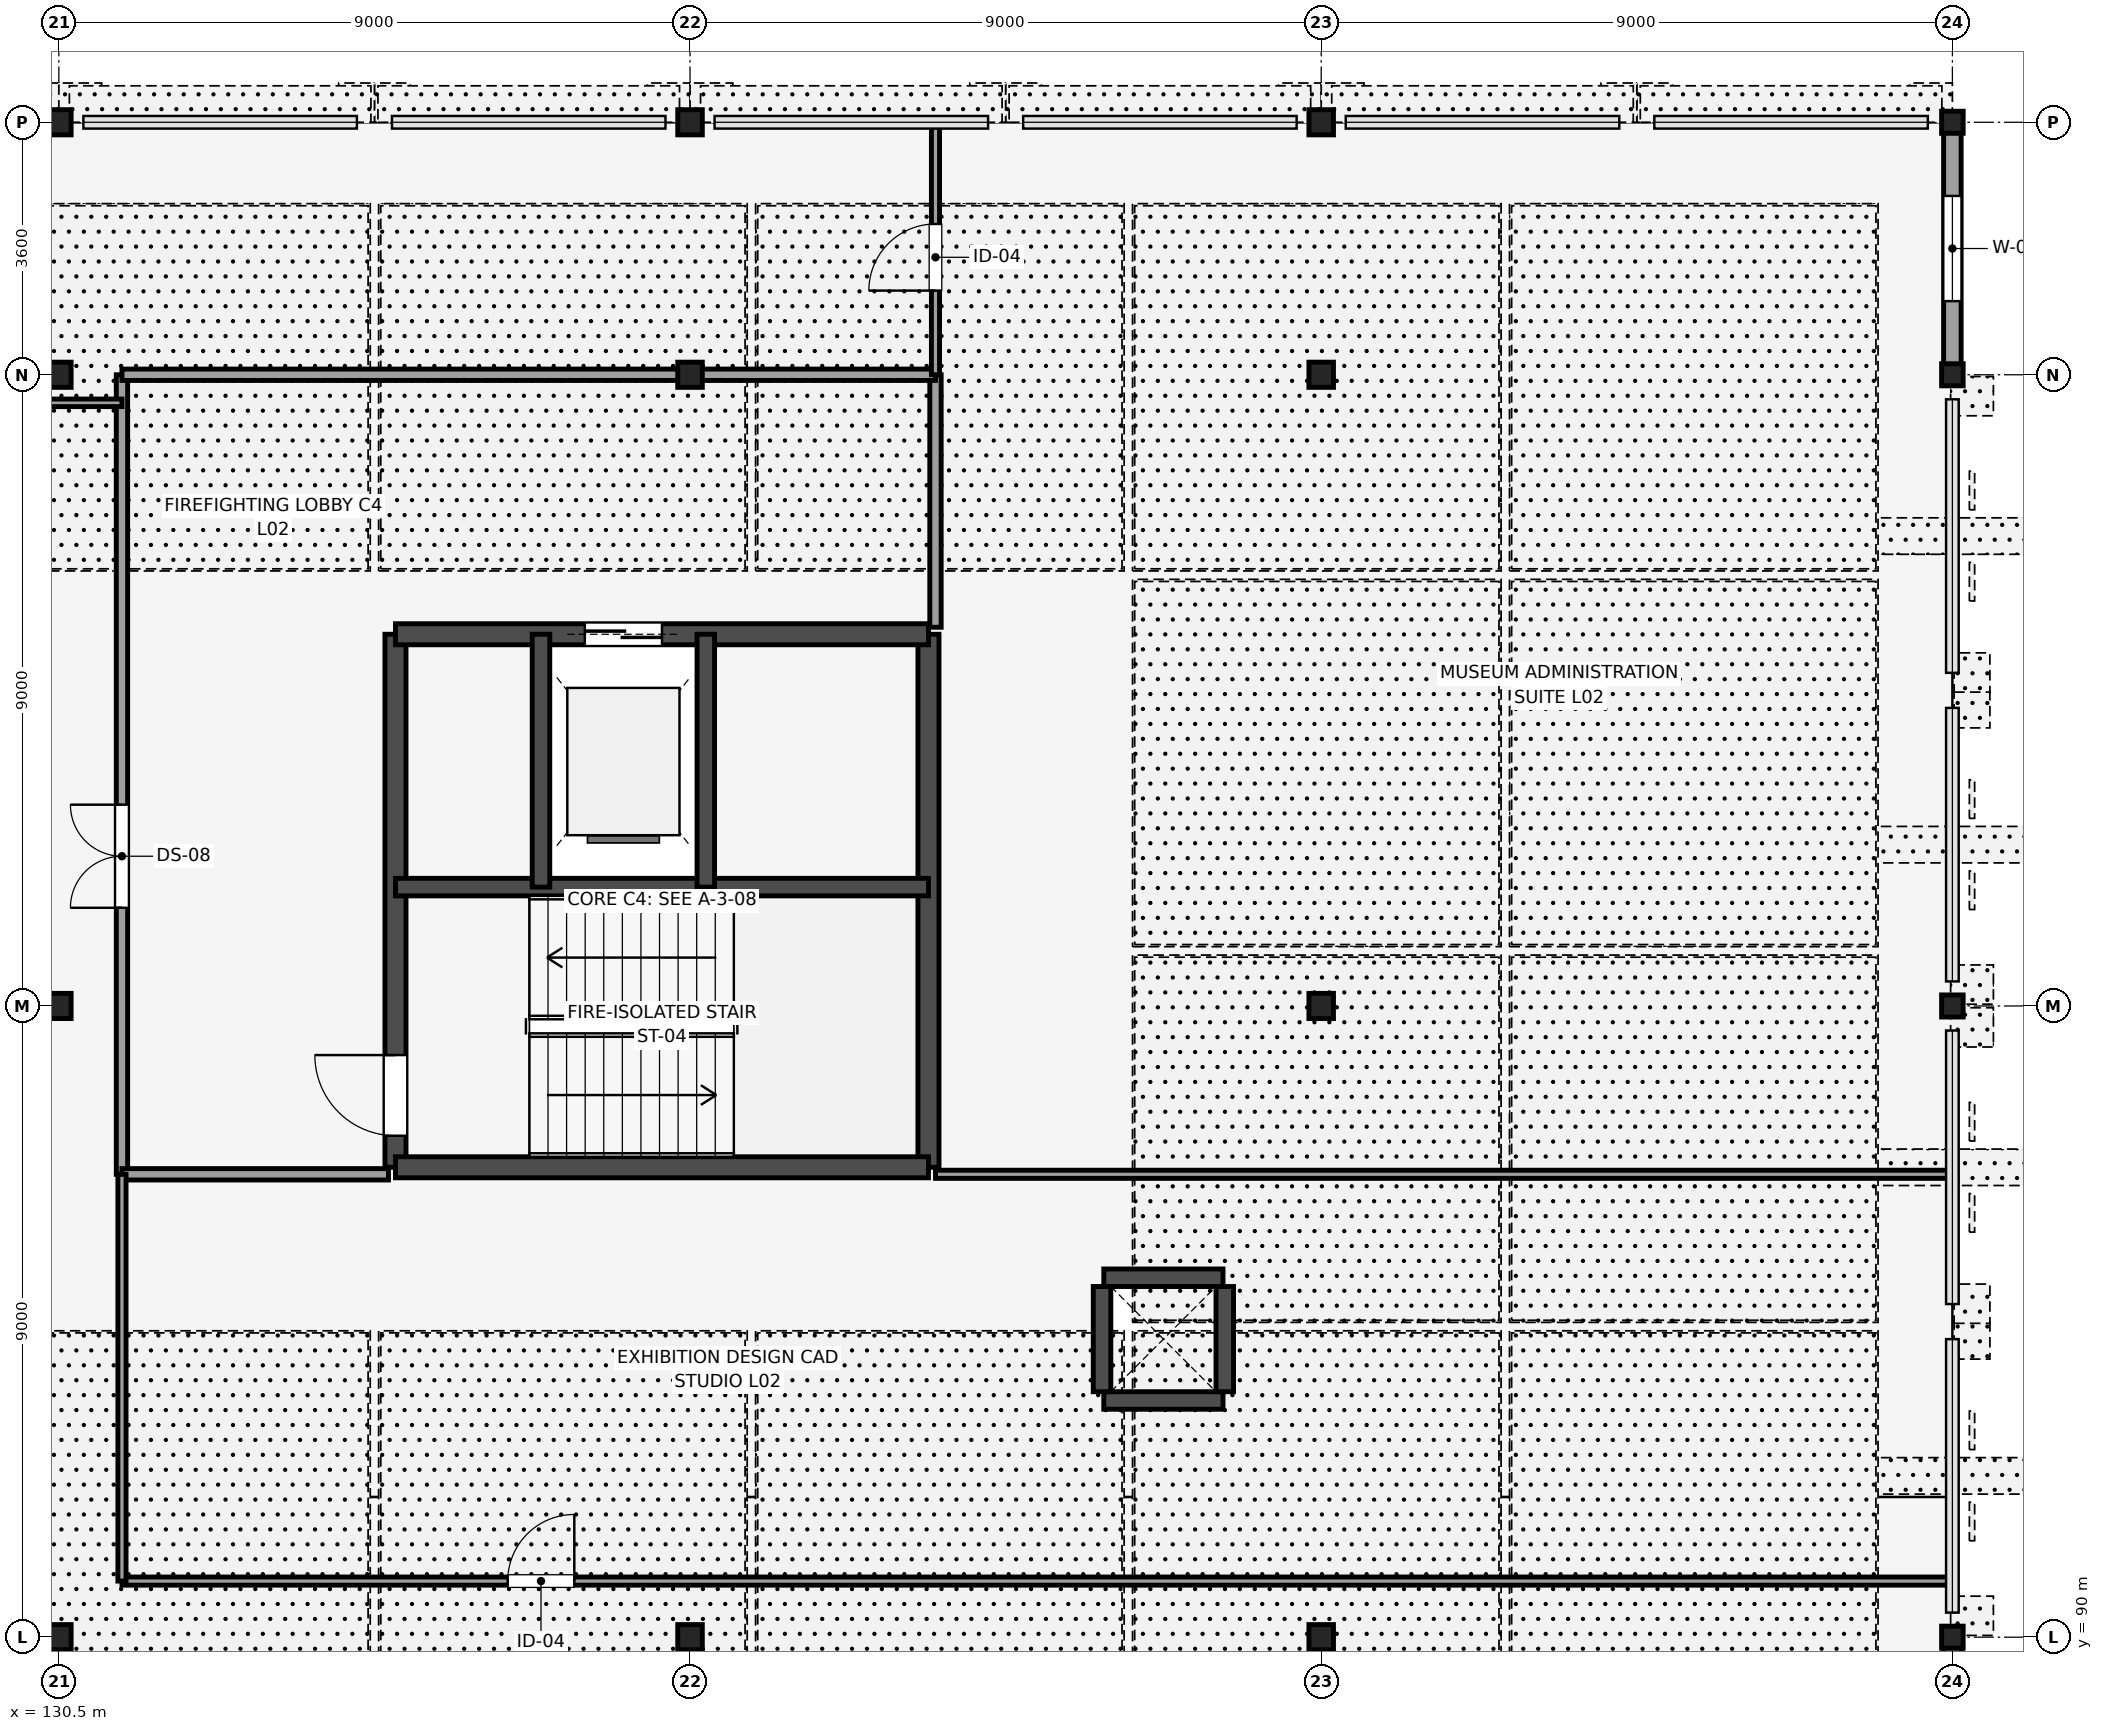
"""IFC4 building model, lengths in metres.
Left out: names, types, materials, properties, quantities, classifications, styles, units other than length and angle.
Written with IfcOpenShell. Run it as: python <this file> out.ifc"""

import sys

from ifc_helpers import new_model, si_unit, direction, frame, frame_2d, origin, origin_2d, place, context, subcontext, project, spatial, rectangle, i_section, extrude, element, fill, save


model = new_model("IFC4")
c1 = context("Model", 3, precision=1e-05, world=origin(), true_north=direction((0.0, 1.0)))
c2 = subcontext(c1, "Body", "Model", "MODEL_VIEW")
j1 = project(units=[si_unit("LENGTHUNIT", "METRE"), si_unit("PLANEANGLEUNIT", "RADIAN")], contexts=[c1])
p1 = place(None, origin())
s1 = spatial("IfcSite", under=j1, at=p1, CompositionType="ELEMENT")
p2 = place(p1, origin())
s2 = spatial("IfcBuilding", under=s1, at=p2, CompositionType="ELEMENT")
p3 = place(p2, frame((0.0, 0.0, 9.9)))
s3 = spatial("IfcBuildingStorey", under=s2, at=p3, CompositionType="ELEMENT", Elevation=9.9)
for number, where, z_axis, x_axis in (
    (1, (130.5, 90.0, 0.0), (0.0, 0.0, 1.0), (1.0, 0.0, 0.0)),
    (2, (130.5, 99.0, 0.0), (0.0, 0.0, 1.0), (1.0, 0.0, 0.0)),
    (3, (130.5, 108.0, 0.0), (0.0, 0.0, 1.0), (1.0, 0.0, 0.0)),
    (4, (130.5, 111.6, 0.0), (0.0, 0.0, 1.0), (1.0, 0.0, 0.0)),
    (5, (139.5, 90.0, 0.0), (0.0, 0.0, 1.0), (1.0, 0.0, 0.0)),
    (6, (139.5, 108.0, 0.0), (0.0, 0.0, 1.0), (1.0, 0.0, 0.0)),
    (7, (139.5, 111.6, 0.0), (0.0, 0.0, 1.0), (1.0, 0.0, 0.0)),
    (8, (148.5, 90.0, 0.0), (0.0, 0.0, 1.0), (1.0, 0.0, 0.0)),
    (9, (148.5, 99.0, 0.0), (0.0, 0.0, 1.0), (1.0, 0.0, 0.0)),
    (10, (148.5, 108.0, 0.0), (0.0, 0.0, 1.0), (1.0, 0.0, 0.0)),
    (11, (148.5, 111.6, 0.0), (0.0, 0.0, 1.0), (1.0, 0.0, 0.0)),
):
    element("IfcColumn", number, at=place(p3, frame(where, z_axis=z_axis, x_axis=x_axis)), inside=s3, PredefinedType="COLUMN", context=c2, shape_type="SweptSolid", body=[
        extrude(i_section(OverallWidth=0.35, OverallDepth=0.359, WebThickness=0.016, FlangeThickness=0.024, FilletRadius=0.014, at=origin_2d()), origin(), (0.0, 0.0, 1.0), 4.5),
    ])
for number, where, z_axis, x_axis in (
    (12, (157.5, 90.0, 0.0), (0.0, 0.0, 1.0), (1.0, 0.0, 0.0)),
    (13, (157.5, 99.0, 0.0), (0.0, 0.0, 1.0), (1.0, 0.0, 0.0)),
    (14, (157.5, 108.0, 0.0), (0.0, 0.0, 1.0), (1.0, 0.0, 0.0)),
    (15, (157.5, 111.6, 0.0), (0.0, 0.0, 1.0), (1.0, 0.0, 0.0)),
):
    element("IfcColumn", number, at=place(p3, frame(where, z_axis=z_axis, x_axis=x_axis)), inside=s3, PredefinedType="COLUMN", context=c2, shape_type="SweptSolid", body=[
        extrude(i_section(OverallWidth=0.307, OverallDepth=0.315, WebThickness=0.012, FlangeThickness=0.019, FilletRadius=0.017, at=origin_2d()), origin(), (0.0, 0.0, 1.0), 4.5),
    ])
p4 = place(p3, frame((135.3, 96.7, 0.0), z_axis=(0.0, 0.0, 1.0), x_axis=(0.0, 1.0, 0.0)))
e16 = element("IfcWall", 16, at=p4, inside=s3, PredefinedType="SHEAR", context=c2, shape_type="SweptSolid", body=[
    extrude(rectangle(XDim=7.6, YDim=0.3, at=frame_2d((3.8, 0.0))), origin(), (0.0, 0.0, 1.0), 4.5),
])
p5 = place(p4, frame((0.45, 0.0, 0.0)))
e17 = element("IfcOpeningElement", 17, at=p5, cuts=e16, PredefinedType="OPENING", context=c2, shape_type="SweptSolid", body=[
    extrude(rectangle(XDim=1.15, YDim=2.15, at=frame_2d((0.575, 1.075))), frame((0.0, 0.16, 0.0), z_axis=(0.0, -1.0, 0.0), x_axis=(1.0, 0.0, 0.0)), (0.0, 0.0, 1.0), 0.32),
])
p6 = place(p3, frame((142.9, 96.7, 0.0), z_axis=(0.0, 0.0, 1.0), x_axis=(0.0, 1.0, 0.0)))
e18 = element("IfcWall", 18, at=p6, inside=s3, PredefinedType="SHEAR", context=c2, shape_type="SweptSolid", body=[
    extrude(rectangle(XDim=7.6, YDim=0.3, at=frame_2d((3.8, 0.0))), origin(), (0.0, 0.0, 1.0), 4.5),
])
p7 = place(p3, frame((135.3, 96.7, 0.0), z_axis=(0.0, 0.0, 1.0), x_axis=(1.0, 0.0, 0.0)))
e19 = element("IfcWall", 19, at=p7, inside=s3, PredefinedType="SHEAR", context=c2, shape_type="SweptSolid", body=[
    extrude(rectangle(XDim=7.6, YDim=0.3, at=frame_2d((3.8, 0.0))), origin(), (0.0, 0.0, 1.0), 4.5),
])
p8 = place(p3, frame((135.3, 104.3, 0.0), z_axis=(0.0, 0.0, 1.0), x_axis=(1.0, 0.0, 0.0)))
e20 = element("IfcWall", 20, at=p8, inside=s3, PredefinedType="SHEAR", context=c2, shape_type="SweptSolid", body=[
    extrude(rectangle(XDim=7.6, YDim=0.3, at=frame_2d((3.8, 0.0))), origin(), (0.0, 0.0, 1.0), 4.5),
])
p9 = place(p8, frame((2.7, 0.0, 0.0)))
e21 = element("IfcOpeningElement", 21, at=p9, cuts=e20, PredefinedType="OPENING", context=c2, shape_type="SweptSolid", body=[
    extrude(rectangle(XDim=1.1, YDim=2.2, at=frame_2d((0.55, 1.1))), frame((0.0, 0.16, 0.0), z_axis=(0.0, -1.0, 0.0), x_axis=(1.0, 0.0, 0.0)), (0.0, 0.0, 1.0), 0.32),
])
p10 = place(p3, frame((135.3, 100.695, 0.0), z_axis=(0.0, 0.0, 1.0), x_axis=(1.0, 0.0, 0.0)))
e22 = element("IfcWall", 22, at=p10, inside=s3, PredefinedType="SHEAR", context=c2, shape_type="SweptSolid", body=[
    extrude(rectangle(XDim=7.6, YDim=0.25, at=frame_2d((3.8, 0.0))), origin(), (0.0, 0.0, 1.0), 4.5),
])
for number, where, z_axis, x_axis in (
    (23, (137.375, 100.695, 0.0), (0.0, 0.0, 1.0), (0.0, 1.0, 0.0)),
    (24, (139.725, 100.695, 0.0), (0.0, 0.0, 1.0), (0.0, 1.0, 0.0)),
):
    element("IfcWall", number, at=place(p3, frame(where, z_axis=z_axis, x_axis=x_axis)), inside=s3, PredefinedType="SHEAR", context=c2, shape_type="SweptSolid", body=[
        extrude(rectangle(XDim=3.605, YDim=0.25, at=frame_2d((1.802, 0.0))), origin(), (0.0, 0.0, 1.0), 4.5),
    ])
for number, where, z_axis, x_axis in (
    (25, (145.4, 93.375, 0.0), (0.0, 0.0, 1.0), (1.0, 0.0, 0.0)),
    (26, (145.4, 95.125, 0.0), (0.0, 0.0, 1.0), (1.0, 0.0, 0.0)),
):
    element("IfcWall", number, at=place(p3, frame(where, z_axis=z_axis, x_axis=x_axis)), inside=s3, PredefinedType="SHEAR", context=c2, shape_type="SweptSolid", body=[
        extrude(rectangle(XDim=1.7, YDim=0.25, at=frame_2d((0.85, 0.0))), origin(), (0.0, 0.0, 1.0), 3.77),
    ])
for number, where, z_axis, x_axis in (
    (27, (145.375, 93.5, 0.0), (0.0, 0.0, 1.0), (0.0, 1.0, 0.0)),
    (28, (147.125, 93.5, 0.0), (0.0, 0.0, 1.0), (0.0, 1.0, 0.0)),
):
    element("IfcWall", number, at=place(p3, frame(where, z_axis=z_axis, x_axis=x_axis)), inside=s3, PredefinedType="SHEAR", context=c2, shape_type="SweptSolid", body=[
        extrude(rectangle(XDim=1.5, YDim=0.25, at=frame_2d((0.75, 0.0))), origin(), (0.0, 0.0, 1.0), 3.77),
    ])
p11 = place(p3, frame((157.5, 81.0, 0.0), z_axis=(0.0, 0.0, 1.0), x_axis=(0.0, 1.0, 0.0)))
e29 = element("IfcWall", 29, at=p11, inside=s3, PredefinedType="STANDARD", context=c2, shape_type="SweptSolid", body=[
    extrude(rectangle(XDim=9.0, YDim=0.25, at=frame_2d((4.5, 0.0))), origin(), (0.0, 0.0, 1.0), 3.846),
])
p12 = place(p3, frame((157.5, 108.0, 0.0), z_axis=(0.0, 0.0, 1.0), x_axis=(0.0, 1.0, 0.0)))
e30 = element("IfcWall", 30, at=p12, inside=s3, PredefinedType="STANDARD", context=c2, shape_type="SweptSolid", body=[
    extrude(rectangle(XDim=3.6, YDim=0.25, at=frame_2d((1.8, 0.0))), origin(), (0.0, 0.0, 1.0), 3.846),
])
p13 = place(p12, frame((1.05, 0.0, 1.0)))
e31 = element("IfcOpeningElement", 31, at=p13, cuts=e30, PredefinedType="OPENING", context=c2, shape_type="SweptSolid", body=[
    extrude(rectangle(XDim=1.5, YDim=1.5, at=frame_2d((0.75, 0.75))), frame((0.0, 0.135, 0.0), z_axis=(0.0, -1.0, 0.0), x_axis=(1.0, 0.0, 0.0)), (0.0, 0.0, 1.0), 0.27),
])
p14 = place(p3, frame((131.4, 96.6, 0.0), z_axis=(0.0, 0.0, 1.0), x_axis=(0.0, 1.0, 0.0)))
e32 = element("IfcWall", 32, at=p14, inside=s3, PredefinedType="PARTITIONING", context=c2, shape_type="SweptSolid", body=[
    extrude(rectangle(XDim=11.4, YDim=0.162, at=frame_2d((5.7, 0.0))), origin(), (0.0, 0.0, 1.0), 4.32),
])
p15 = place(p14, frame((3.8, 0.0, 0.0)))
e33 = element("IfcOpeningElement", 33, at=p15, cuts=e32, PredefinedType="OPENING", context=c2, shape_type="SweptSolid", body=[
    extrude(rectangle(XDim=1.47, YDim=2.175, at=frame_2d((0.735, 1.087))), frame((0.0, 0.091, 0.0), z_axis=(0.0, -1.0, 0.0), x_axis=(1.0, 0.0, 0.0)), (0.0, 0.0, 1.0), 0.182),
])
p16 = place(p3, frame((131.4, 96.6, 0.0), z_axis=(0.0, 0.0, 1.0), x_axis=(1.0, 0.0, 0.0)))
e34 = element("IfcWall", 34, at=p16, inside=s3, PredefinedType="PARTITIONING", context=c2, shape_type="SweptSolid", body=[
    extrude(rectangle(XDim=3.8, YDim=0.162, at=frame_2d((1.9, 0.0))), origin(), (0.0, 0.0, 1.0), 4.32),
])
p17 = place(p3, frame((143.0, 104.4, 0.0), z_axis=(0.0, 0.0, 1.0), x_axis=(0.0, 1.0, 0.0)))
e35 = element("IfcWall", 35, at=p17, inside=s3, PredefinedType="PARTITIONING", context=c2, shape_type="SweptSolid", body=[
    extrude(rectangle(XDim=3.6, YDim=0.162, at=frame_2d((1.8, 0.0))), origin(), (0.0, 0.0, 1.0), 4.32),
])
p18 = place(p3, frame((131.4, 108.0, 0.0), z_axis=(0.0, 0.0, 1.0), x_axis=(1.0, 0.0, 0.0)))
e36 = element("IfcWall", 36, at=p18, inside=s3, PredefinedType="PARTITIONING", context=c2, shape_type="SweptSolid", body=[
    extrude(rectangle(XDim=11.6, YDim=0.162, at=frame_2d((5.8, 0.0))), origin(), (0.0, 0.0, 1.0), 3.846),
])
p19 = place(p3, frame((116.8, 107.6, 0.0), z_axis=(0.0, 0.0, 1.0), x_axis=(1.0, 0.0, 0.0)))
e37 = element("IfcWall", 37, at=p19, inside=s3, PredefinedType="PARTITIONING", context=c2, shape_type="SweptSolid", body=[
    extrude(rectangle(XDim=14.6, YDim=0.108, at=frame_2d((7.3, 0.0))), origin(), (0.0, 0.0, 1.0), 4.32),
])
p20 = place(p19, frame((5.8, 0.0, 0.0)))
e38 = element("IfcOpeningElement", 38, at=p20, cuts=e37, PredefinedType="OPENING", context=c2, shape_type="SweptSolid", body=[
    extrude(rectangle(XDim=2.0, YDim=2.4, at=frame_2d((1.0, 1.2))), frame((0.0, 0.064, 0.0), z_axis=(0.0, -1.0, 0.0), x_axis=(1.0, 0.0, 0.0)), (0.0, 0.0, 1.0), 0.128),
])
p21 = place(p3, frame((131.4, 90.8, 0.0), z_axis=(0.0, 0.0, 1.0), x_axis=(1.0, 0.0, 0.0)))
e39 = element("IfcWall", 39, at=p21, inside=s3, PredefinedType="PARTITIONING", context=c2, shape_type="SweptSolid", body=[
    extrude(rectangle(XDim=26.1, YDim=0.116, at=frame_2d((13.05, 0.0))), origin(), (0.0, 0.0, 1.0), 4.32),
])
p22 = place(p21, frame((5.5, 0.0, 0.0)))
e40 = element("IfcOpeningElement", 40, at=p22, cuts=e39, PredefinedType="OPENING", context=c2, shape_type="SweptSolid", body=[
    extrude(rectangle(XDim=0.95, YDim=2.15, at=frame_2d((0.475, 1.075))), frame((0.0, 0.068, 0.0), z_axis=(0.0, -1.0, 0.0), x_axis=(1.0, 0.0, 0.0)), (0.0, 0.0, 1.0), 0.136),
])
p23 = place(p3, frame((131.4, 90.8, 0.0), z_axis=(0.0, 0.0, 1.0), x_axis=(0.0, 1.0, 0.0)))
e41 = element("IfcWall", 41, at=p23, inside=s3, PredefinedType="PARTITIONING", context=c2, shape_type="SweptSolid", body=[
    extrude(rectangle(XDim=5.8, YDim=0.116, at=frame_2d((2.9, 0.0))), origin(), (0.0, 0.0, 1.0), 4.32),
])
p24 = place(p3, frame((143.0, 96.6, 0.0), z_axis=(0.0, 0.0, 1.0), x_axis=(1.0, 0.0, 0.0)))
e42 = element("IfcWall", 42, at=p24, inside=s3, PredefinedType="PARTITIONING", context=c2, shape_type="SweptSolid", body=[
    extrude(rectangle(XDim=14.5, YDim=0.116, at=frame_2d((7.25, 0.0))), origin(), (0.0, 0.0, 1.0), 4.32),
])
p25 = place(p3, frame((143.0, 108.0, 0.0), z_axis=(0.0, 0.0, 1.0), x_axis=(0.0, 1.0, 0.0)))
e43 = element("IfcWall", 43, at=p25, inside=s3, PredefinedType="PARTITIONING", context=c2, shape_type="SweptSolid", body=[
    extrude(rectangle(XDim=3.6, YDim=0.116, at=frame_2d((1.8, 0.0))), origin(), (0.0, 0.0, 1.0), 4.32),
])
p26 = place(p25, frame((1.2, 0.0, 0.0)))
e44 = element("IfcOpeningElement", 44, at=p26, cuts=e43, PredefinedType="OPENING", context=c2, shape_type="SweptSolid", body=[
    extrude(rectangle(XDim=0.95, YDim=2.15, at=frame_2d((0.475, 1.075))), frame((0.0, 0.068, 0.0), z_axis=(0.0, -1.0, 0.0), x_axis=(1.0, 0.0, 0.0)), (0.0, 0.0, 1.0), 0.136),
])
p27 = place(p13, origin())
e45 = element("IfcWindow", 45, at=p27, inside=s3, PartitioningType="SINGLE_PANEL", PredefinedType="WINDOW", context=c2, shape_type="SweptSolid", body=[
    extrude(rectangle(XDim=1.5, YDim=1.5, at=frame_2d((0.75, 0.75))), frame((0.0, 0.03, 0.0), z_axis=(0.0, -1.0, 0.0), x_axis=(1.0, 0.0, 0.0)), (0.0, 0.0, 1.0), 0.06),
])
fill(e31, e45)
p28 = place(p5, origin())
e46 = element("IfcDoor", 46, at=p28, inside=s3, OperationType="SINGLE_SWING_RIGHT", PredefinedType="DOOR", context=c2, shape_type="SweptSolid", body=[
    extrude(rectangle(XDim=1.15, YDim=2.15, at=frame_2d((0.575, 1.075))), frame((0.0, 0.025, 0.0), z_axis=(0.0, -1.0, 0.0), x_axis=(1.0, 0.0, 0.0)), (0.0, 0.0, 1.0), 0.05),
])
fill(e17, e46)
p29 = place(p9, origin())
e47 = element("IfcDoor", 47, at=p29, inside=s3, OperationType="DOUBLE_DOOR_SLIDING", PredefinedType="DOOR", context=c2, shape_type="SweptSolid", body=[
    extrude(rectangle(XDim=1.1, YDim=2.2, at=frame_2d((0.55, 1.1))), frame((0.0, 0.025, 0.0), z_axis=(0.0, -1.0, 0.0), x_axis=(1.0, 0.0, 0.0)), (0.0, 0.0, 1.0), 0.05),
])
fill(e21, e47)
p30 = place(p15, origin())
e48 = element("IfcDoor", 48, at=p30, inside=s3, OperationType="DOUBLE_DOOR_SINGLE_SWING", PredefinedType="DOOR", context=c2, shape_type="SweptSolid", body=[
    extrude(rectangle(XDim=1.47, YDim=2.175, at=frame_2d((0.735, 1.087))), frame((0.0, 0.025, 0.0), z_axis=(0.0, -1.0, 0.0), x_axis=(1.0, 0.0, 0.0)), (0.0, 0.0, 1.0), 0.05),
])
fill(e33, e48)
p31 = place(p22, origin())
e49 = element("IfcDoor", 49, at=p31, inside=s3, OperationType="SINGLE_SWING_RIGHT", PredefinedType="DOOR", context=c2, shape_type="SweptSolid", body=[
    extrude(rectangle(XDim=0.95, YDim=2.15, at=frame_2d((0.475, 1.075))), frame((0.0, 0.025, 0.0), z_axis=(0.0, -1.0, 0.0), x_axis=(1.0, 0.0, 0.0)), (0.0, 0.0, 1.0), 0.05),
])
fill(e40, e49)
p32 = place(p26, origin())
e50 = element("IfcDoor", 50, at=p32, inside=s3, OperationType="SINGLE_SWING_LEFT", PredefinedType="DOOR", context=c2, shape_type="SweptSolid", body=[
    extrude(rectangle(XDim=0.95, YDim=2.15, at=frame_2d((0.475, 1.075))), frame((0.0, 0.025, 0.0), z_axis=(0.0, -1.0, 0.0), x_axis=(1.0, 0.0, 0.0)), (0.0, 0.0, 1.0), 0.05),
])
fill(e44, e50)
save(model, sys.argv[1])
